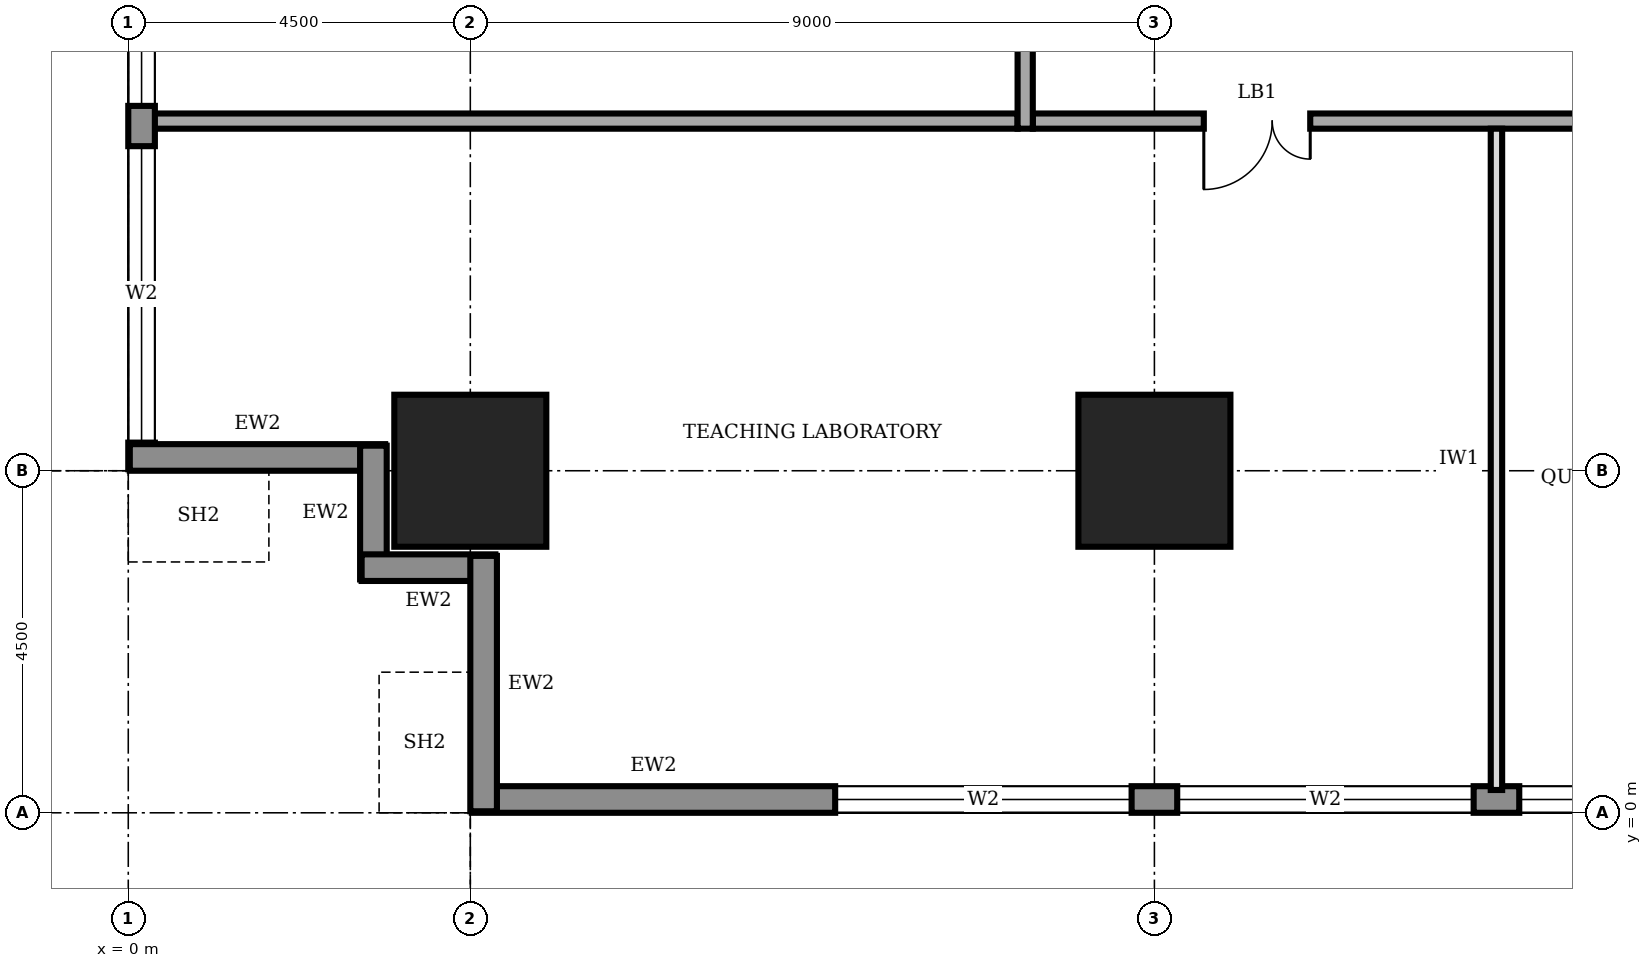
"""IFC4 building model, lengths in metres.
Left out: names, types, materials, properties, quantities, classifications, styles, units other than length and angle.
Written with IfcOpenShell. Run it as: python <this file> out.ifc"""

import sys

from ifc_helpers import new_model, si_unit, direction, frame, frame_2d, origin, origin_2d, place, context, subcontext, project, spatial, rectangle, extrude, element, fill, save


model = new_model("IFC4")
c1 = context("Model", 3, precision=1e-05, world=origin(), true_north=direction((0.0, 1.0)))
c2 = subcontext(c1, "Body", "Model", "MODEL_VIEW")
j1 = project(units=[si_unit("LENGTHUNIT", "METRE"), si_unit("PLANEANGLEUNIT", "RADIAN")], contexts=[c1])
p1 = place(None, origin())
s1 = spatial("IfcSite", under=j1, at=p1, CompositionType="ELEMENT")
p2 = place(p1, origin())
s2 = spatial("IfcBuilding", under=s1, at=p2, CompositionType="ELEMENT")
p3 = place(p2, frame((0.0, 0.0, 61.0)))
s3 = spatial("IfcBuildingStorey", under=s2, at=p3, CompositionType="ELEMENT", Elevation=61.0)
for number, where, z_axis, x_axis in (
    (1, (4.5, 4.5, 0.0), (0.0, 0.0, 1.0), (1.0, 0.0, 0.0)),
    (2, (13.5, 4.5, 0.0), (0.0, 0.0, 1.0), (1.0, 0.0, 0.0)),
):
    element("IfcColumn", number, at=place(p3, frame(where, z_axis=z_axis, x_axis=x_axis)), inside=s3, PredefinedType="COLUMN", context=c2, shape_type="SweptSolid", body=[
        extrude(rectangle(XDim=2.0, YDim=2.0, at=origin_2d()), origin(), (0.0, 0.0, 1.0), 4.0),
    ])
p4 = place(p3, frame((4.52, 0.175, 0.0), z_axis=(0.0, 0.0, 1.0), x_axis=(1.0, 0.0, 0.0)))
e3 = element("IfcWall", 3, at=p4, inside=s3, PredefinedType="STANDARD", context=c2, shape_type="SweptSolid", body=[
    extrude(rectangle(XDim=31.46, YDim=0.35, at=frame_2d((15.73, 0.0))), origin(), (0.0, 0.0, 1.0), 3.75),
])
p5 = place(p4, frame((4.78, 0.0, 0.6)))
e4 = element("IfcOpeningElement", 4, at=p5, cuts=e3, PredefinedType="OPENING", context=c2, shape_type="SweptSolid", body=[
    extrude(rectangle(XDim=3.9, YDim=2.6, at=frame_2d((1.95, 1.3))), frame((0.0, 0.185, 0.0), z_axis=(0.0, -1.0, 0.0), x_axis=(1.0, 0.0, 0.0)), (0.0, 0.0, 1.0), 0.37),
])
p6 = place(p4, frame((9.28, 0.0, 0.6)))
e5 = element("IfcOpeningElement", 5, at=p6, cuts=e3, PredefinedType="OPENING", context=c2, shape_type="SweptSolid", body=[
    extrude(rectangle(XDim=3.9, YDim=2.6, at=frame_2d((1.95, 1.3))), frame((0.0, 0.185, 0.0), z_axis=(0.0, -1.0, 0.0), x_axis=(1.0, 0.0, 0.0)), (0.0, 0.0, 1.0), 0.37),
])
p7 = place(p4, frame((13.78, 0.0, 0.6)))
e6 = element("IfcOpeningElement", 6, at=p7, cuts=e3, PredefinedType="OPENING", context=c2, shape_type="SweptSolid", body=[
    extrude(rectangle(XDim=3.9, YDim=2.6, at=frame_2d((1.95, 1.3))), frame((0.0, 0.185, 0.0), z_axis=(0.0, -1.0, 0.0), x_axis=(1.0, 0.0, 0.0)), (0.0, 0.0, 1.0), 0.37),
])
p8 = place(p4, frame((18.28, 0.0, 0.6)))
e7 = element("IfcOpeningElement", 7, at=p8, cuts=e3, PredefinedType="OPENING", context=c2, shape_type="SweptSolid", body=[
    extrude(rectangle(XDim=3.9, YDim=2.6, at=frame_2d((1.95, 1.3))), frame((0.0, 0.185, 0.0), z_axis=(0.0, -1.0, 0.0), x_axis=(1.0, 0.0, 0.0)), (0.0, 0.0, 1.0), 0.37),
])
p9 = place(p4, frame((22.78, 0.0, 0.6)))
e8 = element("IfcOpeningElement", 8, at=p9, cuts=e3, PredefinedType="OPENING", context=c2, shape_type="SweptSolid", body=[
    extrude(rectangle(XDim=3.9, YDim=2.6, at=frame_2d((1.95, 1.3))), frame((0.0, 0.185, 0.0), z_axis=(0.0, -1.0, 0.0), x_axis=(1.0, 0.0, 0.0)), (0.0, 0.0, 1.0), 0.37),
])
p10 = place(p4, frame((27.21, 0.0, 0.6)))
e9 = element("IfcOpeningElement", 9, at=p10, cuts=e3, PredefinedType="OPENING", context=c2, shape_type="SweptSolid", body=[
    extrude(rectangle(XDim=3.9, YDim=2.6, at=frame_2d((1.95, 1.3))), frame((0.0, 0.185, 0.0), z_axis=(0.0, -1.0, 0.0), x_axis=(1.0, 0.0, 0.0)), (0.0, 0.0, 1.0), 0.37),
])
p11 = place(p3, frame((0.175, 35.98, 0.0), z_axis=(0.0, 0.0, 1.0), x_axis=(0.0, -1.0, 0.0)))
e10 = element("IfcWall", 10, at=p11, inside=s3, PredefinedType="STANDARD", context=c2, shape_type="SweptSolid", body=[
    extrude(rectangle(XDim=31.46, YDim=0.35, at=frame_2d((15.73, 0.0))), origin(), (0.0, 0.0, 1.0), 3.75),
])
p12 = place(p11, frame((27.21, 0.0, 0.6)))
e11 = element("IfcOpeningElement", 11, at=p12, cuts=e10, PredefinedType="OPENING", context=c2, shape_type="SweptSolid", body=[
    extrude(rectangle(XDim=3.9, YDim=2.6, at=frame_2d((1.95, 1.3))), frame((0.0, 0.185, 0.0), z_axis=(0.0, -1.0, 0.0), x_axis=(1.0, 0.0, 0.0)), (0.0, 0.0, 1.0), 0.37),
])
p13 = place(p11, frame((22.78, 0.0, 0.6)))
e12 = element("IfcOpeningElement", 12, at=p13, cuts=e10, PredefinedType="OPENING", context=c2, shape_type="SweptSolid", body=[
    extrude(rectangle(XDim=3.9, YDim=2.6, at=frame_2d((1.95, 1.3))), frame((0.0, 0.185, 0.0), z_axis=(0.0, -1.0, 0.0), x_axis=(1.0, 0.0, 0.0)), (0.0, 0.0, 1.0), 0.37),
])
p14 = place(p11, frame((18.28, 0.0, 0.6)))
e13 = element("IfcOpeningElement", 13, at=p14, cuts=e10, PredefinedType="OPENING", context=c2, shape_type="SweptSolid", body=[
    extrude(rectangle(XDim=3.9, YDim=2.6, at=frame_2d((1.95, 1.3))), frame((0.0, 0.185, 0.0), z_axis=(0.0, -1.0, 0.0), x_axis=(1.0, 0.0, 0.0)), (0.0, 0.0, 1.0), 0.37),
])
p15 = place(p11, frame((13.78, 0.0, 0.6)))
e14 = element("IfcOpeningElement", 14, at=p15, cuts=e10, PredefinedType="OPENING", context=c2, shape_type="SweptSolid", body=[
    extrude(rectangle(XDim=3.9, YDim=2.6, at=frame_2d((1.95, 1.3))), frame((0.0, 0.185, 0.0), z_axis=(0.0, -1.0, 0.0), x_axis=(1.0, 0.0, 0.0)), (0.0, 0.0, 1.0), 0.37),
])
p16 = place(p11, frame((9.28, 0.0, 0.6)))
e15 = element("IfcOpeningElement", 15, at=p16, cuts=e10, PredefinedType="OPENING", context=c2, shape_type="SweptSolid", body=[
    extrude(rectangle(XDim=3.9, YDim=2.6, at=frame_2d((1.95, 1.3))), frame((0.0, 0.185, 0.0), z_axis=(0.0, -1.0, 0.0), x_axis=(1.0, 0.0, 0.0)), (0.0, 0.0, 1.0), 0.37),
])
p17 = place(p11, frame((4.78, 0.0, 0.6)))
e16 = element("IfcOpeningElement", 16, at=p17, cuts=e10, PredefinedType="OPENING", context=c2, shape_type="SweptSolid", body=[
    extrude(rectangle(XDim=3.9, YDim=2.6, at=frame_2d((1.95, 1.3))), frame((0.0, 0.185, 0.0), z_axis=(0.0, -1.0, 0.0), x_axis=(1.0, 0.0, 0.0)), (0.0, 0.0, 1.0), 0.37),
])
p18 = place(p3, frame((0.02, 4.675, 0.0), z_axis=(0.0, 0.0, 1.0), x_axis=(1.0, 0.0, 0.0)))
e17 = element("IfcWall", 17, at=p18, inside=s3, PredefinedType="STANDARD", context=c2, shape_type="SweptSolid", body=[
    extrude(rectangle(XDim=3.36, YDim=0.35, at=frame_2d((1.68, 0.0))), origin(), (0.0, 0.0, 1.0), 2.85),
])
for number, where, z_axis, x_axis in (
    (18, (3.225, 4.83, 0.0), (0.0, 0.0, 1.0), (0.0, -1.0, 0.0)),
    (19, (3.07, 3.225, 0.0), (0.0, 0.0, 1.0), (1.0, 0.0, 0.0)),
):
    element("IfcWall", number, at=place(p3, frame(where, z_axis=z_axis, x_axis=x_axis)), inside=s3, PredefinedType="STANDARD", context=c2, shape_type="SweptSolid", body=[
        extrude(rectangle(XDim=1.76, YDim=0.35, at=frame_2d((0.88, 0.0))), origin(), (0.0, 0.0, 1.0), 3.75),
    ])
p19 = place(p3, frame((4.675, 3.38, 0.0), z_axis=(0.0, 0.0, 1.0), x_axis=(0.0, -1.0, 0.0)))
e20 = element("IfcWall", 20, at=p19, inside=s3, PredefinedType="STANDARD", context=c2, shape_type="SweptSolid", body=[
    extrude(rectangle(XDim=3.36, YDim=0.35, at=frame_2d((1.68, 0.0))), origin(), (0.0, 0.0, 1.0), 2.85),
])
p20 = place(p3, frame((11.9, 9.1, 0.0), z_axis=(0.0, 0.0, 1.0), x_axis=(1.0, 0.0, 0.0)))
e21 = element("IfcWall", 21, at=p20, inside=s3, PredefinedType="SOLIDWALL", context=c2, shape_type="SweptSolid", body=[
    extrude(rectangle(XDim=18.4, YDim=0.2, at=frame_2d((9.2, 0.0))), origin(), (0.0, 0.0, 1.0), 3.75),
])
p21 = place(p20, frame((2.25, 0.0, 0.0)))
e22 = element("IfcOpeningElement", 22, at=p21, cuts=e21, PredefinedType="OPENING", context=c2, shape_type="SweptSolid", body=[
    extrude(rectangle(XDim=1.4, YDim=2.1, at=frame_2d((0.7, 1.05))), frame((0.0, 0.11, 0.0), z_axis=(0.0, -1.0, 0.0), x_axis=(1.0, 0.0, 0.0)), (0.0, 0.0, 1.0), 0.22),
])
p22 = place(p20, frame((7.85, 0.0, 0.0)))
e23 = element("IfcOpeningElement", 23, at=p22, cuts=e21, PredefinedType="OPENING", context=c2, shape_type="SweptSolid", body=[
    extrude(rectangle(XDim=1.0, YDim=2.1, at=frame_2d((0.5, 1.05))), frame((0.0, 0.11, 0.0), z_axis=(0.0, -1.0, 0.0), x_axis=(1.0, 0.0, 0.0)), (0.0, 0.0, 1.0), 0.22),
])
p23 = place(p20, frame((13.8, 0.0, 0.0)))
e24 = element("IfcOpeningElement", 24, at=p23, cuts=e21, PredefinedType="OPENING", context=c2, shape_type="SweptSolid", body=[
    extrude(rectangle(XDim=1.4, YDim=2.1, at=frame_2d((0.7, 1.05))), frame((0.0, 0.11, 0.0), z_axis=(0.0, -1.0, 0.0), x_axis=(1.0, 0.0, 0.0)), (0.0, 0.0, 1.0), 0.22),
])
p24 = place(p3, frame((11.8, 31.3, 0.0), z_axis=(0.0, 0.0, 1.0), x_axis=(0.0, -1.0, 0.0)))
e25 = element("IfcWall", 25, at=p24, inside=s3, PredefinedType="SOLIDWALL", context=c2, shape_type="SweptSolid", body=[
    extrude(rectangle(XDim=22.3, YDim=0.2, at=frame_2d((11.15, 0.0))), origin(), (0.0, 0.0, 1.0), 3.75),
])
p25 = place(p24, frame((19.55, 0.0, 0.0)))
e26 = element("IfcOpeningElement", 26, at=p25, cuts=e25, PredefinedType="OPENING", context=c2, shape_type="SweptSolid", body=[
    extrude(rectangle(XDim=1.0, YDim=2.1, at=frame_2d((0.5, 1.05))), frame((0.0, 0.11, 0.0), z_axis=(0.0, -1.0, 0.0), x_axis=(1.0, 0.0, 0.0)), (0.0, 0.0, 1.0), 0.22),
])
p26 = place(p24, frame((16.2, 0.0, 0.0)))
e27 = element("IfcOpeningElement", 27, at=p26, cuts=e25, PredefinedType="OPENING", context=c2, shape_type="SweptSolid", body=[
    extrude(rectangle(XDim=1.0, YDim=2.1, at=frame_2d((0.5, 1.05))), frame((0.0, 0.11, 0.0), z_axis=(0.0, -1.0, 0.0), x_axis=(1.0, 0.0, 0.0)), (0.0, 0.0, 1.0), 0.22),
])
p27 = place(p24, frame((13.2, 0.0, 0.0)))
e28 = element("IfcOpeningElement", 28, at=p27, cuts=e25, PredefinedType="OPENING", context=c2, shape_type="SweptSolid", body=[
    extrude(rectangle(XDim=0.9, YDim=2.1, at=frame_2d((0.45, 1.05))), frame((0.0, 0.11, 0.0), z_axis=(0.0, -1.0, 0.0), x_axis=(1.0, 0.0, 0.0)), (0.0, 0.0, 1.0), 0.22),
])
p28 = place(p24, frame((10.15, 0.0, 0.0)))
e29 = element("IfcOpeningElement", 29, at=p28, cuts=e25, PredefinedType="OPENING", context=c2, shape_type="SweptSolid", body=[
    extrude(rectangle(XDim=0.9, YDim=2.1, at=frame_2d((0.45, 1.05))), frame((0.0, 0.11, 0.0), z_axis=(0.0, -1.0, 0.0), x_axis=(1.0, 0.0, 0.0)), (0.0, 0.0, 1.0), 0.22),
])
p29 = place(p24, frame((5.45, 0.0, 0.0)))
e30 = element("IfcOpeningElement", 30, at=p29, cuts=e25, PredefinedType="OPENING", context=c2, shape_type="SweptSolid", body=[
    extrude(rectangle(XDim=0.9, YDim=2.1, at=frame_2d((0.45, 1.05))), frame((0.0, 0.11, 0.0), z_axis=(0.0, -1.0, 0.0), x_axis=(1.0, 0.0, 0.0)), (0.0, 0.0, 1.0), 0.22),
])
p30 = place(p24, frame((8.0, 0.0, 0.0)))
e31 = element("IfcOpeningElement", 31, at=p30, cuts=e25, PredefinedType="OPENING", context=c2, shape_type="SweptSolid", body=[
    extrude(rectangle(XDim=1.0, YDim=2.1, at=frame_2d((0.5, 1.05))), frame((0.0, 0.11, 0.0), z_axis=(0.0, -1.0, 0.0), x_axis=(1.0, 0.0, 0.0)), (0.0, 0.0, 1.0), 0.22),
])
p31 = place(p24, frame((1.55, 0.0, 0.0)))
e32 = element("IfcOpeningElement", 32, at=p31, cuts=e25, PredefinedType="OPENING", context=c2, shape_type="SweptSolid", body=[
    extrude(rectangle(XDim=1.0, YDim=2.1, at=frame_2d((0.5, 1.05))), frame((0.0, 0.11, 0.0), z_axis=(0.0, -1.0, 0.0), x_axis=(1.0, 0.0, 0.0)), (0.0, 0.0, 1.0), 0.22),
])
p32 = place(p3, frame((0.3, 9.1, 0.0), z_axis=(0.0, 0.0, 1.0), x_axis=(1.0, 0.0, 0.0)))
e33 = element("IfcWall", 33, at=p32, inside=s3, PredefinedType="SOLIDWALL", context=c2, shape_type="SweptSolid", body=[
    extrude(rectangle(XDim=11.4, YDim=0.2, at=frame_2d((5.7, 0.0))), origin(), (0.0, 0.0, 1.0), 3.75),
])
p33 = place(p3, frame((18.0, 0.3, 0.0), z_axis=(0.0, 0.0, 1.0), x_axis=(0.0, 1.0, 0.0)))
e34 = element("IfcWall", 34, at=p33, inside=s3, PredefinedType="PARTITIONING", context=c2, shape_type="SweptSolid", body=[
    extrude(rectangle(XDim=8.7, YDim=0.15, at=frame_2d((4.35, 0.0))), origin(), (0.0, 0.0, 1.0), 3.75),
])
p34 = place(p5, origin())
e35 = element("IfcWindow", 35, at=p34, inside=s3, PartitioningType="SINGLE_PANEL", PredefinedType="WINDOW", context=c2, shape_type="SweptSolid", body=[
    extrude(rectangle(XDim=3.9, YDim=2.6, at=frame_2d((1.95, 1.3))), frame((0.0, 0.03, 0.0), z_axis=(0.0, -1.0, 0.0), x_axis=(1.0, 0.0, 0.0)), (0.0, 0.0, 1.0), 0.06),
])
fill(e4, e35)
p35 = place(p6, origin())
e36 = element("IfcWindow", 36, at=p35, inside=s3, PartitioningType="SINGLE_PANEL", PredefinedType="WINDOW", context=c2, shape_type="SweptSolid", body=[
    extrude(rectangle(XDim=3.9, YDim=2.6, at=frame_2d((1.95, 1.3))), frame((0.0, 0.03, 0.0), z_axis=(0.0, -1.0, 0.0), x_axis=(1.0, 0.0, 0.0)), (0.0, 0.0, 1.0), 0.06),
])
fill(e5, e36)
p36 = place(p7, origin())
e37 = element("IfcWindow", 37, at=p36, inside=s3, PartitioningType="SINGLE_PANEL", PredefinedType="WINDOW", context=c2, shape_type="SweptSolid", body=[
    extrude(rectangle(XDim=3.9, YDim=2.6, at=frame_2d((1.95, 1.3))), frame((0.0, 0.03, 0.0), z_axis=(0.0, -1.0, 0.0), x_axis=(1.0, 0.0, 0.0)), (0.0, 0.0, 1.0), 0.06),
])
fill(e6, e37)
p37 = place(p12, origin())
e38 = element("IfcWindow", 38, at=p37, inside=s3, PartitioningType="SINGLE_PANEL", PredefinedType="WINDOW", context=c2, shape_type="SweptSolid", body=[
    extrude(rectangle(XDim=3.9, YDim=2.6, at=frame_2d((1.95, 1.3))), frame((0.0, 0.03, 0.0), z_axis=(0.0, -1.0, 0.0), x_axis=(1.0, 0.0, 0.0)), (0.0, 0.0, 1.0), 0.06),
])
fill(e11, e38)
p38 = place(p13, origin())
e39 = element("IfcWindow", 39, at=p38, inside=s3, PartitioningType="SINGLE_PANEL", PredefinedType="WINDOW", context=c2, shape_type="SweptSolid", body=[
    extrude(rectangle(XDim=3.9, YDim=2.6, at=frame_2d((1.95, 1.3))), frame((0.0, 0.03, 0.0), z_axis=(0.0, -1.0, 0.0), x_axis=(1.0, 0.0, 0.0)), (0.0, 0.0, 1.0), 0.06),
])
fill(e12, e39)
p39 = place(p21, frame((1.4, 0.0, 0.0), z_axis=(0.0, 0.0, 1.0), x_axis=(-1.0, 0.0, 0.0)))
e40 = element("IfcDoor", 40, at=p39, inside=s3, OperationType="DOUBLE_DOOR_SINGLE_SWING", PredefinedType="DOOR", context=c2, shape_type="SweptSolid", body=[
    extrude(rectangle(XDim=1.4, YDim=2.1, at=frame_2d((0.7, 1.05))), frame((0.0, 0.025, 0.0), z_axis=(0.0, -1.0, 0.0), x_axis=(1.0, 0.0, 0.0)), (0.0, 0.0, 1.0), 0.05),
])
fill(e22, e40)
save(model, sys.argv[1])
